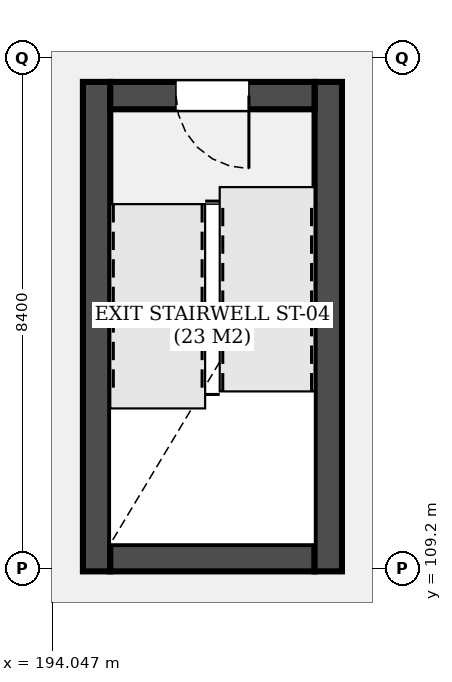
"""IFC4 building model, lengths in metres.
Left out: names, types, materials, properties, quantities, classifications, styles, units other than length and angle.
Written with IfcOpenShell. Run it as: python <this file> out.ifc"""

import sys

from ifc_helpers import new_model, si_unit, direction, frame, frame_2d, origin, place, context, subcontext, project, spatial, rectangle, extrude, element, fill, save


model = new_model("IFC4")
c1 = context("Model", 3, precision=1e-05, world=origin(), true_north=direction((0.0, 1.0)))
c2 = subcontext(c1, "Body", "Model", "MODEL_VIEW")
j1 = project(units=[si_unit("LENGTHUNIT", "METRE"), si_unit("PLANEANGLEUNIT", "RADIAN")], contexts=[c1])
p1 = place(None, origin())
s1 = spatial("IfcSite", under=j1, at=p1, CompositionType="ELEMENT")
p2 = place(p1, origin())
s2 = spatial("IfcBuilding", under=s1, at=p2, CompositionType="ELEMENT")
p3 = place(p2, frame((0.0, 0.0, 13.5)))
s3 = spatial("IfcBuildingStorey", under=s2, at=p3, CompositionType="ELEMENT", Elevation=13.5)
p4 = place(p3, frame((194.775, 117.2, 0.0), z_axis=(0.0, 0.0, 1.0), x_axis=(0.0, -1.0, 0.0)))
e1 = element("IfcWall", 1, at=p4, inside=s3, PredefinedType="SHEAR", context=c2, shape_type="SweptSolid", body=[
    extrude(rectangle(XDim=8.05, YDim=0.45, at=frame_2d((4.025, 0.0))), origin(), (0.0, 0.0, 1.0), 4.3),
])
p5 = place(p3, frame((195.0, 109.375, 0.0), z_axis=(0.0, 0.0, 1.0), x_axis=(1.0, 0.0, 0.0)))
e2 = element("IfcWall", 2, at=p5, inside=s3, PredefinedType="SHEAR", context=c2, shape_type="SweptSolid", body=[
    extrude(rectangle(XDim=3.36, YDim=0.45, at=frame_2d((1.68, 0.0))), origin(), (0.0, 0.0, 1.0), 4.3),
])
p6 = place(p3, frame((198.585, 109.15, 0.0), z_axis=(0.0, 0.0, 1.0), x_axis=(0.0, 1.0, 0.0)))
e3 = element("IfcWall", 3, at=p6, inside=s3, PredefinedType="SHEAR", context=c2, shape_type="SweptSolid", body=[
    extrude(rectangle(XDim=8.05, YDim=0.45, at=frame_2d((4.025, 0.0))), origin(), (0.0, 0.0, 1.0), 4.3),
])
p7 = place(p3, frame((198.36, 116.975, 0.0), z_axis=(0.0, 0.0, 1.0), x_axis=(-1.0, 0.0, 0.0)))
e4 = element("IfcWall", 4, at=p7, inside=s3, PredefinedType="SHEAR", context=c2, shape_type="SweptSolid", body=[
    extrude(rectangle(XDim=3.36, YDim=0.45, at=frame_2d((1.68, 0.0))), origin(), (0.0, 0.0, 1.0), 4.3),
])
p8 = place(p7, frame((1.08, 0.0, 0.0)))
e5 = element("IfcOpeningElement", 5, at=p8, cuts=e4, PredefinedType="OPENING", context=c2, shape_type="SweptSolid", body=[
    extrude(rectangle(XDim=1.2, YDim=2.2, at=frame_2d((0.6, 1.1))), frame((0.0, 0.235, 0.0), z_axis=(0.0, -1.0, 0.0), x_axis=(1.0, 0.0, 0.0)), (0.0, 0.0, 1.0), 0.47),
])
p9 = place(p8, origin())
e6 = element("IfcDoor", 6, at=p9, inside=s3, OperationType="SINGLE_SWING_LEFT", PredefinedType="DOOR", context=c2, shape_type="SweptSolid", body=[
    extrude(rectangle(XDim=1.2, YDim=2.2, at=frame_2d((0.6, 1.1))), frame((0.0, 0.025, 0.0), z_axis=(0.0, -1.0, 0.0), x_axis=(1.0, 0.0, 0.0)), (0.0, 0.0, 1.0), 0.05),
])
fill(e5, e6)
save(model, sys.argv[1])
